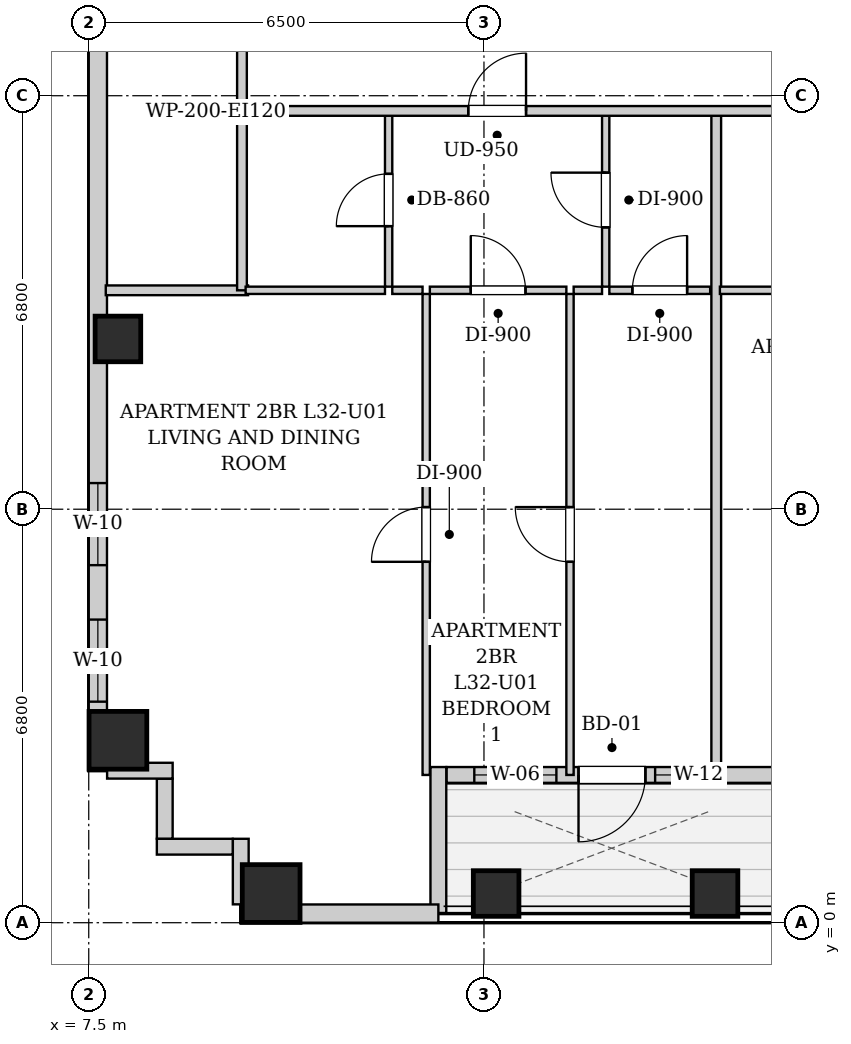
"""IFC4 building model, lengths in metres.
Left out: names, types, materials, properties, quantities, classifications, styles, units other than length and angle.
Written with IfcOpenShell. Run it as: python <this file> out.ifc"""

import sys

from ifc_helpers import new_model, si_unit, direction, frame, frame_2d, origin, origin_2d, place, context, subcontext, project, spatial, rectangle, extrude, element, fill, save


model = new_model("IFC4")
c1 = context("Model", 3, precision=1e-05, world=origin(), true_north=direction((0.0, 1.0)))
c2 = subcontext(c1, "Body", "Model", "MODEL_VIEW")
j1 = project(units=[si_unit("LENGTHUNIT", "METRE"), si_unit("PLANEANGLEUNIT", "RADIAN")], contexts=[c1])
p1 = place(None, origin())
s1 = spatial("IfcSite", under=j1, at=p1, CompositionType="ELEMENT")
p2 = place(p1, origin())
s2 = spatial("IfcBuilding", under=s1, at=p2, CompositionType="ELEMENT")
p3 = place(p2, frame((0.0, 0.0, 113.5)))
s3 = spatial("IfcBuildingStorey", under=s2, at=p3, CompositionType="ELEMENT", Elevation=113.5)
p4 = place(p3, frame((10.5, 0.48, 0.0), z_axis=(0.0, 0.0, 1.0), x_axis=(1.0, 0.0, 0.0)))
e1 = element("IfcColumn", 1, at=p4, inside=s3, PredefinedType="COLUMN", context=c2, shape_type="SweptSolid", body=[
    extrude(rectangle(XDim=0.95, YDim=0.95, at=origin_2d()), origin(), (0.0, 0.0, 1.0), 3.2),
])
for number, where, z_axis, x_axis in (
    (2, (14.2, 0.48, 0.0), (0.0, 0.0, 1.0), (1.0, 0.0, 0.0)),
    (3, (17.8, 0.48, 0.0), (0.0, 0.0, 1.0), (1.0, 0.0, 0.0)),
):
    element("IfcColumn", number, at=place(p3, frame(where, z_axis=z_axis, x_axis=x_axis)), inside=s3, PredefinedType="COLUMN", context=c2, shape_type="SweptSolid", body=[
        extrude(rectangle(XDim=0.75, YDim=0.75, at=origin_2d()), origin(), (0.0, 0.0, 1.0), 3.2),
    ])
p5 = place(p3, frame((7.98, 3.0, 0.0), z_axis=(0.0, 0.0, 1.0), x_axis=(1.0, 0.0, 0.0)))
e4 = element("IfcColumn", 4, at=p5, inside=s3, PredefinedType="COLUMN", context=c2, shape_type="SweptSolid", body=[
    extrude(rectangle(XDim=0.95, YDim=0.95, at=origin_2d()), origin(), (0.0, 0.0, 1.0), 3.2),
])
p6 = place(p3, frame((7.98, 9.6, 0.0), z_axis=(0.0, 0.0, 1.0), x_axis=(1.0, 0.0, 0.0)))
e5 = element("IfcColumn", 5, at=p6, inside=s3, PredefinedType="COLUMN", context=c2, shape_type="SweptSolid", body=[
    extrude(rectangle(XDim=0.75, YDim=0.75, at=origin_2d()), origin(), (0.0, 0.0, 1.0), 3.2),
])
p7 = place(p3, frame((18.816, 2.43, 0.0), z_axis=(0.0, 0.0, 1.0), x_axis=(-1.0, 0.0, 0.0)))
e6 = element("IfcWall", 6, at=p7, inside=s3, PredefinedType="SOLIDWALL", context=c2, shape_type="SweptSolid", body=[
    extrude(rectangle(XDim=5.432, YDim=0.26, at=frame_2d((2.716, 0.0))), origin(), (0.0, 0.0, 1.0), 2.94),
])
p8 = place(p7, frame((2.161, 0.0, 0.0)))
e7 = element("IfcOpeningElement", 7, at=p8, cuts=e6, PredefinedType="OPENING", context=c2, shape_type="SweptSolid", body=[
    extrude(rectangle(XDim=1.1, YDim=2.0, at=frame_2d((0.55, 1.0))), frame((0.0, 0.14, 0.0), z_axis=(0.0, -1.0, 0.0), x_axis=(1.0, 0.0, 0.0)), (0.0, 0.0, 1.0), 0.28),
])
p9 = place(p7, frame((3.625, 0.0, 0.85)))
e8 = element("IfcOpeningElement", 8, at=p9, cuts=e6, PredefinedType="OPENING", context=c2, shape_type="SweptSolid", body=[
    extrude(rectangle(XDim=1.35, YDim=1.65, at=frame_2d((0.675, 0.825))), frame((0.0, 0.14, 0.0), z_axis=(0.0, -1.0, 0.0), x_axis=(1.0, 0.0, 0.0)), (0.0, 0.0, 1.0), 0.28),
])
p10 = place(p7, frame((1.321, 0.0, 0.55)))
e9 = element("IfcOpeningElement", 9, at=p10, cuts=e6, PredefinedType="OPENING", context=c2, shape_type="SweptSolid", body=[
    extrude(rectangle(XDim=0.68, YDim=1.2, at=frame_2d((0.34, 0.6))), frame((0.0, 0.14, 0.0), z_axis=(0.0, -1.0, 0.0), x_axis=(1.0, 0.0, 0.0)), (0.0, 0.0, 1.0), 0.28),
])
p11 = place(p3, frame((13.25, 2.56, 0.0), z_axis=(0.0, 0.0, 1.0), x_axis=(0.0, -1.0, 0.0)))
e10 = element("IfcWall", 10, at=p11, inside=s3, PredefinedType="SOLIDWALL", context=c2, shape_type="SweptSolid", body=[
    extrude(rectangle(XDim=2.4, YDim=0.26, at=frame_2d((1.2, 0.0))), origin(), (0.0, 0.0, 1.0), 2.94),
])
p12 = place(p3, frame((13.25, 0.15, 0.0), z_axis=(0.0, 0.0, 1.0), x_axis=(-1.0, 0.0, 0.0)))
e11 = element("IfcWall", 11, at=p12, inside=s3, PredefinedType="SOLIDWALL", context=c2, shape_type="SweptSolid", body=[
    extrude(rectangle(XDim=3.25, YDim=0.3, at=frame_2d((1.625, 0.0))), origin(), (0.0, 0.0, 1.0), 2.94),
])
p13 = place(p3, frame((7.65, 2.5, 0.0), z_axis=(0.0, 0.0, 1.0), x_axis=(0.0, 1.0, 0.0)))
e12 = element("IfcWall", 12, at=p13, inside=s3, PredefinedType="SOLIDWALL", context=c2, shape_type="SweptSolid", body=[
    extrude(rectangle(XDim=38.3, YDim=0.3, at=frame_2d((19.15, 0.0))), origin(), (0.0, 0.0, 1.0), 2.94),
])
p14 = place(p13, frame((3.38, 0.0, 0.55)))
e13 = element("IfcOpeningElement", 13, at=p14, cuts=e12, PredefinedType="OPENING", context=c2, shape_type="SweptSolid", body=[
    extrude(rectangle(XDim=1.35, YDim=1.2, at=frame_2d((0.675, 0.6))), frame((0.0, 0.16, 0.0), z_axis=(0.0, -1.0, 0.0), x_axis=(1.0, 0.0, 0.0)), (0.0, 0.0, 1.0), 0.32),
])
p15 = place(p13, frame((1.135, 0.0, 0.55)))
e14 = element("IfcOpeningElement", 14, at=p15, cuts=e12, PredefinedType="OPENING", context=c2, shape_type="SweptSolid", body=[
    extrude(rectangle(XDim=1.35, YDim=1.2, at=frame_2d((0.675, 0.6))), frame((0.0, 0.16, 0.0), z_axis=(0.0, -1.0, 0.0), x_axis=(1.0, 0.0, 0.0)), (0.0, 0.0, 1.0), 0.32),
])
p16 = place(p13, frame((33.946, 0.0, 0.55)))
e15 = element("IfcOpeningElement", 15, at=p16, cuts=e12, PredefinedType="OPENING", context=c2, shape_type="SweptSolid", body=[
    extrude(rectangle(XDim=1.35, YDim=1.2, at=frame_2d((0.675, 0.6))), frame((0.0, 0.16, 0.0), z_axis=(0.0, -1.0, 0.0), x_axis=(1.0, 0.0, 0.0)), (0.0, 0.0, 1.0), 0.32),
])
p17 = place(p13, frame((32.035, 0.0, 0.55)))
e16 = element("IfcOpeningElement", 16, at=p17, cuts=e12, PredefinedType="OPENING", context=c2, shape_type="SweptSolid", body=[
    extrude(rectangle(XDim=1.35, YDim=1.2, at=frame_2d((0.675, 0.6))), frame((0.0, 0.16, 0.0), z_axis=(0.0, -1.0, 0.0), x_axis=(1.0, 0.0, 0.0)), (0.0, 0.0, 1.0), 0.32),
])
p18 = place(p13, frame((15.65, 0.0, 0.55)))
e17 = element("IfcOpeningElement", 17, at=p18, cuts=e12, PredefinedType="OPENING", context=c2, shape_type="SweptSolid", body=[
    extrude(rectangle(XDim=1.35, YDim=1.2, at=frame_2d((0.675, 0.6))), frame((0.0, 0.16, 0.0), z_axis=(0.0, -1.0, 0.0), x_axis=(1.0, 0.0, 0.0)), (0.0, 0.0, 1.0), 0.32),
])
p19 = place(p13, frame((13.035, 0.0, 0.55)))
e18 = element("IfcOpeningElement", 18, at=p19, cuts=e12, PredefinedType="OPENING", context=c2, shape_type="SweptSolid", body=[
    extrude(rectangle(XDim=1.35, YDim=1.2, at=frame_2d((0.675, 0.6))), frame((0.0, 0.16, 0.0), z_axis=(0.0, -1.0, 0.0), x_axis=(1.0, 0.0, 0.0)), (0.0, 0.0, 1.0), 0.32),
])
p20 = place(p13, frame((22.831, 0.0, 0.55)))
e19 = element("IfcOpeningElement", 19, at=p20, cuts=e12, PredefinedType="OPENING", context=c2, shape_type="SweptSolid", body=[
    extrude(rectangle(XDim=1.35, YDim=1.2, at=frame_2d((0.675, 0.6))), frame((0.0, 0.16, 0.0), z_axis=(0.0, -1.0, 0.0), x_axis=(1.0, 0.0, 0.0)), (0.0, 0.0, 1.0), 0.32),
])
p21 = place(p13, frame((24.441, 0.0, 0.55)))
e20 = element("IfcOpeningElement", 20, at=p21, cuts=e12, PredefinedType="OPENING", context=c2, shape_type="SweptSolid", body=[
    extrude(rectangle(XDim=1.35, YDim=1.2, at=frame_2d((0.675, 0.6))), frame((0.0, 0.16, 0.0), z_axis=(0.0, -1.0, 0.0), x_axis=(1.0, 0.0, 0.0)), (0.0, 0.0, 1.0), 0.32),
])
p22 = place(p3, frame((10.0, 0.302, 0.0), z_axis=(0.0, 0.0, 1.0), x_axis=(0.0, 1.0, 0.0)))
e21 = element("IfcWall", 21, at=p22, inside=s3, PredefinedType="SOLIDWALL", context=c2, shape_type="SweptSolid", body=[
    extrude(rectangle(XDim=1.078, YDim=0.26, at=frame_2d((0.539, 0.0))), origin(), (0.0, 0.0, 1.0), 2.94),
])
p23 = place(p3, frame((9.868, 1.25, 0.0), z_axis=(0.0, 0.0, 1.0), x_axis=(-1.0, 0.0, 0.0)))
e22 = element("IfcWall", 22, at=p23, inside=s3, PredefinedType="SOLIDWALL", context=c2, shape_type="SweptSolid", body=[
    extrude(rectangle(XDim=1.248, YDim=0.26, at=frame_2d((0.624, 0.0))), origin(), (0.0, 0.0, 1.0), 2.94),
])
p24 = place(p3, frame((8.75, 1.382, 0.0), z_axis=(0.0, 0.0, 1.0), x_axis=(0.0, 1.0, 0.0)))
e23 = element("IfcWall", 23, at=p24, inside=s3, PredefinedType="SOLIDWALL", context=c2, shape_type="SweptSolid", body=[
    extrude(rectangle(XDim=0.986, YDim=0.26, at=frame_2d((0.493, 0.0))), origin(), (0.0, 0.0, 1.0), 2.94),
])
p25 = place(p3, frame((8.88, 2.5, 0.0), z_axis=(0.0, 0.0, 1.0), x_axis=(-1.0, 0.0, 0.0)))
e24 = element("IfcWall", 24, at=p25, inside=s3, PredefinedType="SOLIDWALL", context=c2, shape_type="SweptSolid", body=[
    extrude(rectangle(XDim=1.078, YDim=0.26, at=frame_2d((0.539, 0.0))), origin(), (0.0, 0.0, 1.0), 2.94),
])
p26 = place(p3, frame((10.02, 13.35, 0.0), z_axis=(0.0, 0.0, 1.0), x_axis=(0.0, 1.0, 0.0)))
e25 = element("IfcWall", 25, at=p26, inside=s3, PredefinedType="PARTITIONING", context=c2, shape_type="SweptSolid", body=[
    extrude(rectangle(XDim=1.74, YDim=0.16, at=frame_2d((0.87, 0.0))), origin(), (0.0, 0.0, 1.0), 2.94),
])
p27 = place(p3, frame((7.78, 10.4, 0.0), z_axis=(0.0, 0.0, 1.0), x_axis=(1.0, 0.0, 0.0)))
e26 = element("IfcWall", 26, at=p27, inside=s3, PredefinedType="PARTITIONING", context=c2, shape_type="SweptSolid", body=[
    extrude(rectangle(XDim=2.34, YDim=0.16, at=frame_2d((1.17, 0.0))), origin(), (0.0, 0.0, 1.0), 2.94),
])
p28 = place(p3, frame((10.02, 10.4, 0.0), z_axis=(0.0, 0.0, 1.0), x_axis=(0.0, 1.0, 0.0)))
e27 = element("IfcWall", 27, at=p28, inside=s3, PredefinedType="PARTITIONING", context=c2, shape_type="SweptSolid", body=[
    extrude(rectangle(XDim=2.91, YDim=0.16, at=frame_2d((1.455, 0.0))), origin(), (0.0, 0.0, 1.0), 2.94),
])
p29 = place(p3, frame((12.432, 10.46, 0.0), z_axis=(0.0, 0.0, 1.0), x_axis=(0.0, 1.0, 0.0)))
e28 = element("IfcWall", 28, at=p29, inside=s3, PredefinedType="PARTITIONING", context=c2, shape_type="SweptSolid", body=[
    extrude(rectangle(XDim=2.85, YDim=0.12, at=frame_2d((1.425, 0.0))), origin(), (0.0, 0.0, 1.0), 2.94),
])
p30 = place(p29, frame((0.995, 0.0, 0.0)))
e29 = element("IfcOpeningElement", 29, at=p30, cuts=e28, PredefinedType="OPENING", context=c2, shape_type="SweptSolid", body=[
    extrude(rectangle(XDim=0.86, YDim=2.05, at=frame_2d((0.43, 1.025))), frame((0.0, 0.07, 0.0), z_axis=(0.0, -1.0, 0.0), x_axis=(1.0, 0.0, 0.0)), (0.0, 0.0, 1.0), 0.14),
])
p31 = place(p3, frame((10.08, 10.4, 0.0), z_axis=(0.0, 0.0, 1.0), x_axis=(1.0, 0.0, 0.0)))
e30 = element("IfcWall", 30, at=p31, inside=s3, PredefinedType="PARTITIONING", context=c2, shape_type="SweptSolid", body=[
    extrude(rectangle(XDim=2.292, YDim=0.12, at=frame_2d((1.146, 0.0))), origin(), (0.0, 0.0, 1.0), 2.94),
])
p32 = place(p3, frame((16.002, 10.46, 0.0), z_axis=(0.0, 0.0, 1.0), x_axis=(0.0, 1.0, 0.0)))
e31 = element("IfcWall", 31, at=p32, inside=s3, PredefinedType="PARTITIONING", context=c2, shape_type="SweptSolid", body=[
    extrude(rectangle(XDim=2.85, YDim=0.12, at=frame_2d((1.425, 0.0))), origin(), (0.0, 0.0, 1.0), 2.94),
])
p33 = place(p32, frame((0.975, 0.0, 0.0)))
e32 = element("IfcOpeningElement", 32, at=p33, cuts=e31, PredefinedType="OPENING", context=c2, shape_type="SweptSolid", body=[
    extrude(rectangle(XDim=0.9, YDim=2.05, at=frame_2d((0.45, 1.025))), frame((0.0, 0.07, 0.0), z_axis=(0.0, -1.0, 0.0), x_axis=(1.0, 0.0, 0.0)), (0.0, 0.0, 1.0), 0.14),
])
p34 = place(p3, frame((12.492, 10.4, 0.0), z_axis=(0.0, 0.0, 1.0), x_axis=(1.0, 0.0, 0.0)))
e33 = element("IfcWall", 33, at=p34, inside=s3, PredefinedType="PARTITIONING", context=c2, shape_type="SweptSolid", body=[
    extrude(rectangle(XDim=0.498, YDim=0.12, at=frame_2d((0.249, 0.0))), origin(), (0.0, 0.0, 1.0), 2.94),
])
p35 = place(p3, frame((13.11, 10.4, 0.0), z_axis=(0.0, 0.0, 1.0), x_axis=(1.0, 0.0, 0.0)))
e34 = element("IfcWall", 34, at=p35, inside=s3, PredefinedType="PARTITIONING", context=c2, shape_type="SweptSolid", body=[
    extrude(rectangle(XDim=2.245, YDim=0.12, at=frame_2d((1.123, 0.0))), origin(), (0.0, 0.0, 1.0), 2.94),
])
p36 = place(p35, frame((0.673, 0.0, 0.0)))
e35 = element("IfcOpeningElement", 35, at=p36, cuts=e34, PredefinedType="OPENING", context=c2, shape_type="SweptSolid", body=[
    extrude(rectangle(XDim=0.9, YDim=2.05, at=frame_2d((0.45, 1.025))), frame((0.0, 0.07, 0.0), z_axis=(0.0, -1.0, 0.0), x_axis=(1.0, 0.0, 0.0)), (0.0, 0.0, 1.0), 0.14),
])
p37 = place(p3, frame((15.475, 10.4, 0.0), z_axis=(0.0, 0.0, 1.0), x_axis=(1.0, 0.0, 0.0)))
e36 = element("IfcWall", 36, at=p37, inside=s3, PredefinedType="PARTITIONING", context=c2, shape_type="SweptSolid", body=[
    extrude(rectangle(XDim=0.467, YDim=0.12, at=frame_2d((0.233, 0.0))), origin(), (0.0, 0.0, 1.0), 2.94),
])
p38 = place(p3, frame((16.062, 10.4, 0.0), z_axis=(0.0, 0.0, 1.0), x_axis=(1.0, 0.0, 0.0)))
e37 = element("IfcWall", 37, at=p38, inside=s3, PredefinedType="PARTITIONING", context=c2, shape_type="SweptSolid", body=[
    extrude(rectangle(XDim=1.658, YDim=0.12, at=frame_2d((0.829, 0.0))), origin(), (0.0, 0.0, 1.0), 2.94),
])
p39 = place(p38, frame((0.379, 0.0, 0.0)))
e38 = element("IfcOpeningElement", 38, at=p39, cuts=e37, PredefinedType="OPENING", context=c2, shape_type="SweptSolid", body=[
    extrude(rectangle(XDim=0.9, YDim=2.05, at=frame_2d((0.45, 1.025))), frame((0.0, 0.07, 0.0), z_axis=(0.0, -1.0, 0.0), x_axis=(1.0, 0.0, 0.0)), (0.0, 0.0, 1.0), 0.14),
])
p40 = place(p3, frame((13.05, 2.43, 0.0), z_axis=(0.0, 0.0, 1.0), x_axis=(0.0, 1.0, 0.0)))
e39 = element("IfcWall", 39, at=p40, inside=s3, PredefinedType="PARTITIONING", context=c2, shape_type="SweptSolid", body=[
    extrude(rectangle(XDim=7.91, YDim=0.12, at=frame_2d((3.955, 0.0))), origin(), (0.0, 0.0, 1.0), 2.94),
])
p41 = place(p40, frame((3.505, 0.0, 0.0)))
e40 = element("IfcOpeningElement", 40, at=p41, cuts=e39, PredefinedType="OPENING", context=c2, shape_type="SweptSolid", body=[
    extrude(rectangle(XDim=0.9, YDim=2.05, at=frame_2d((0.45, 1.025))), frame((0.0, 0.07, 0.0), z_axis=(0.0, -1.0, 0.0), x_axis=(1.0, 0.0, 0.0)), (0.0, 0.0, 1.0), 0.14),
])
p42 = place(p3, frame((15.415, 2.43, 0.0), z_axis=(0.0, 0.0, 1.0), x_axis=(0.0, 1.0, 0.0)))
e41 = element("IfcWall", 41, at=p42, inside=s3, PredefinedType="PARTITIONING", context=c2, shape_type="SweptSolid", body=[
    extrude(rectangle(XDim=7.91, YDim=0.12, at=frame_2d((3.955, 0.0))), origin(), (0.0, 0.0, 1.0), 2.94),
])
p43 = place(p42, frame((3.505, 0.0, 0.0)))
e42 = element("IfcOpeningElement", 42, at=p43, cuts=e41, PredefinedType="OPENING", context=c2, shape_type="SweptSolid", body=[
    extrude(rectangle(XDim=0.9, YDim=2.05, at=frame_2d((0.45, 1.025))), frame((0.0, 0.07, 0.0), z_axis=(0.0, -1.0, 0.0), x_axis=(1.0, 0.0, 0.0)), (0.0, 0.0, 1.0), 0.14),
])
p44 = place(p3, frame((17.82, 2.26, 0.0), z_axis=(0.0, 0.0, 1.0), x_axis=(0.0, 1.0, 0.0)))
e43 = element("IfcWall", 43, at=p44, inside=s3, PredefinedType="PARTITIONING", context=c2, shape_type="SweptSolid", body=[
    extrude(rectangle(XDim=11.05, YDim=0.16, at=frame_2d((5.525, 0.0))), origin(), (0.0, 0.0, 1.0), 2.313),
])
p45 = place(p3, frame((17.88, 10.4, 0.0), z_axis=(0.0, 0.0, 1.0), x_axis=(1.0, 0.0, 0.0)))
e44 = element("IfcWall", 44, at=p45, inside=s3, PredefinedType="PARTITIONING", context=c2, shape_type="SweptSolid", body=[
    extrude(rectangle(XDim=2.4, YDim=0.12, at=frame_2d((1.2, 0.0))), origin(), (0.0, 0.0, 1.0), 2.94),
])
p46 = place(p3, frame((10.05, 13.35, 0.0), z_axis=(0.0, 0.0, 1.0), x_axis=(1.0, 0.0, 0.0)))
e45 = element("IfcWall", 45, at=p46, inside=s3, PredefinedType="PARTITIONING", context=c2, shape_type="SweptSolid", body=[
    extrude(rectangle(XDim=30.8, YDim=0.16, at=frame_2d((15.4, 0.0))), origin(), (0.0, 0.0, 1.0), 2.94),
])
p47 = place(p46, frame((3.692, 0.0, 0.0)))
e46 = element("IfcOpeningElement", 46, at=p47, cuts=e45, PredefinedType="OPENING", context=c2, shape_type="SweptSolid", body=[
    extrude(rectangle(XDim=0.95, YDim=2.1, at=frame_2d((0.475, 1.05))), frame((0.0, 0.09, 0.0), z_axis=(0.0, -1.0, 0.0), x_axis=(1.0, 0.0, 0.0)), (0.0, 0.0, 1.0), 0.18),
])
p48 = place(p46, frame((12.095, 0.0, 0.0)))
e47 = element("IfcOpeningElement", 47, at=p48, cuts=e45, PredefinedType="OPENING", context=c2, shape_type="SweptSolid", body=[
    extrude(rectangle(XDim=0.95, YDim=2.1, at=frame_2d((0.475, 1.05))), frame((0.0, 0.09, 0.0), z_axis=(0.0, -1.0, 0.0), x_axis=(1.0, 0.0, 0.0)), (0.0, 0.0, 1.0), 0.18),
])
p49 = place(p30, origin())
e48 = element("IfcDoor", 48, at=p49, inside=s3, OperationType="SINGLE_SWING_LEFT", PredefinedType="DOOR", context=c2, shape_type="SweptSolid", body=[
    extrude(rectangle(XDim=0.86, YDim=2.05, at=frame_2d((0.43, 1.025))), frame((0.0, 0.025, 0.0), z_axis=(0.0, -1.0, 0.0), x_axis=(1.0, 0.0, 0.0)), (0.0, 0.0, 1.0), 0.05),
])
fill(e29, e48)
p50 = place(p33, origin())
e49 = element("IfcDoor", 49, at=p50, inside=s3, OperationType="SINGLE_SWING_RIGHT", PredefinedType="DOOR", context=c2, shape_type="SweptSolid", body=[
    extrude(rectangle(XDim=0.9, YDim=2.05, at=frame_2d((0.45, 1.025))), frame((0.0, 0.025, 0.0), z_axis=(0.0, -1.0, 0.0), x_axis=(1.0, 0.0, 0.0)), (0.0, 0.0, 1.0), 0.05),
])
fill(e32, e49)
p51 = place(p36, origin())
e50 = element("IfcDoor", 50, at=p51, inside=s3, OperationType="SINGLE_SWING_LEFT", PredefinedType="DOOR", context=c2, shape_type="SweptSolid", body=[
    extrude(rectangle(XDim=0.9, YDim=2.05, at=frame_2d((0.45, 1.025))), frame((0.0, 0.025, 0.0), z_axis=(0.0, -1.0, 0.0), x_axis=(1.0, 0.0, 0.0)), (0.0, 0.0, 1.0), 0.05),
])
fill(e35, e50)
p52 = place(p39, origin())
e51 = element("IfcDoor", 51, at=p52, inside=s3, OperationType="SINGLE_SWING_RIGHT", PredefinedType="DOOR", context=c2, shape_type="SweptSolid", body=[
    extrude(rectangle(XDim=0.9, YDim=2.05, at=frame_2d((0.45, 1.025))), frame((0.0, 0.025, 0.0), z_axis=(0.0, -1.0, 0.0), x_axis=(1.0, 0.0, 0.0)), (0.0, 0.0, 1.0), 0.05),
])
fill(e38, e51)
p53 = place(p41, origin())
e52 = element("IfcDoor", 52, at=p53, inside=s3, OperationType="SINGLE_SWING_LEFT", PredefinedType="DOOR", context=c2, shape_type="SweptSolid", body=[
    extrude(rectangle(XDim=0.9, YDim=2.05, at=frame_2d((0.45, 1.025))), frame((0.0, 0.025, 0.0), z_axis=(0.0, -1.0, 0.0), x_axis=(1.0, 0.0, 0.0)), (0.0, 0.0, 1.0), 0.05),
])
fill(e40, e52)
p54 = place(p43, origin())
e53 = element("IfcDoor", 53, at=p54, inside=s3, OperationType="SINGLE_SWING_RIGHT", PredefinedType="DOOR", context=c2, shape_type="SweptSolid", body=[
    extrude(rectangle(XDim=0.9, YDim=2.05, at=frame_2d((0.45, 1.025))), frame((0.0, 0.025, 0.0), z_axis=(0.0, -1.0, 0.0), x_axis=(1.0, 0.0, 0.0)), (0.0, 0.0, 1.0), 0.05),
])
fill(e42, e53)
p55 = place(p47, origin())
e54 = element("IfcDoor", 54, at=p55, inside=s3, OperationType="SINGLE_SWING_RIGHT", PredefinedType="DOOR", context=c2, shape_type="SweptSolid", body=[
    extrude(rectangle(XDim=0.95, YDim=2.1, at=frame_2d((0.475, 1.05))), frame((0.0, 0.025, 0.0), z_axis=(0.0, -1.0, 0.0), x_axis=(1.0, 0.0, 0.0)), (0.0, 0.0, 1.0), 0.05),
])
fill(e46, e54)
p56 = place(p8, origin())
e55 = element("IfcDoor", 55, at=p56, inside=s3, OperationType="SINGLE_SWING_RIGHT", PredefinedType="DOOR", context=c2, shape_type="SweptSolid", body=[
    extrude(rectangle(XDim=1.1, YDim=2.0, at=frame_2d((0.55, 1.0))), frame((0.0, 0.025, 0.0), z_axis=(0.0, -1.0, 0.0), x_axis=(1.0, 0.0, 0.0)), (0.0, 0.0, 1.0), 0.05),
])
fill(e7, e55)
p57 = place(p14, origin())
e56 = element("IfcWindow", 56, at=p57, inside=s3, PartitioningType="SINGLE_PANEL", PredefinedType="WINDOW", context=c2, shape_type="SweptSolid", body=[
    extrude(rectangle(XDim=1.35, YDim=1.2, at=frame_2d((0.675, 0.6))), frame((0.0, 0.03, 0.0), z_axis=(0.0, -1.0, 0.0), x_axis=(1.0, 0.0, 0.0)), (0.0, 0.0, 1.0), 0.06),
])
fill(e13, e56)
p58 = place(p15, origin())
e57 = element("IfcWindow", 57, at=p58, inside=s3, PartitioningType="SINGLE_PANEL", PredefinedType="WINDOW", context=c2, shape_type="SweptSolid", body=[
    extrude(rectangle(XDim=1.35, YDim=1.2, at=frame_2d((0.675, 0.6))), frame((0.0, 0.03, 0.0), z_axis=(0.0, -1.0, 0.0), x_axis=(1.0, 0.0, 0.0)), (0.0, 0.0, 1.0), 0.06),
])
fill(e14, e57)
p59 = place(p9, origin())
e58 = element("IfcWindow", 58, at=p59, inside=s3, PartitioningType="SINGLE_PANEL", PredefinedType="WINDOW", context=c2, shape_type="SweptSolid", body=[
    extrude(rectangle(XDim=1.35, YDim=1.65, at=frame_2d((0.675, 0.825))), frame((0.0, 0.03, 0.0), z_axis=(0.0, -1.0, 0.0), x_axis=(1.0, 0.0, 0.0)), (0.0, 0.0, 1.0), 0.06),
])
fill(e8, e58)
p60 = place(p10, origin())
e59 = element("IfcWindow", 59, at=p60, inside=s3, PartitioningType="SINGLE_PANEL", PredefinedType="WINDOW", context=c2, shape_type="SweptSolid", body=[
    extrude(rectangle(XDim=0.68, YDim=1.2, at=frame_2d((0.34, 0.6))), frame((0.0, 0.03, 0.0), z_axis=(0.0, -1.0, 0.0), x_axis=(1.0, 0.0, 0.0)), (0.0, 0.0, 1.0), 0.06),
])
fill(e9, e59)
save(model, sys.argv[1])
